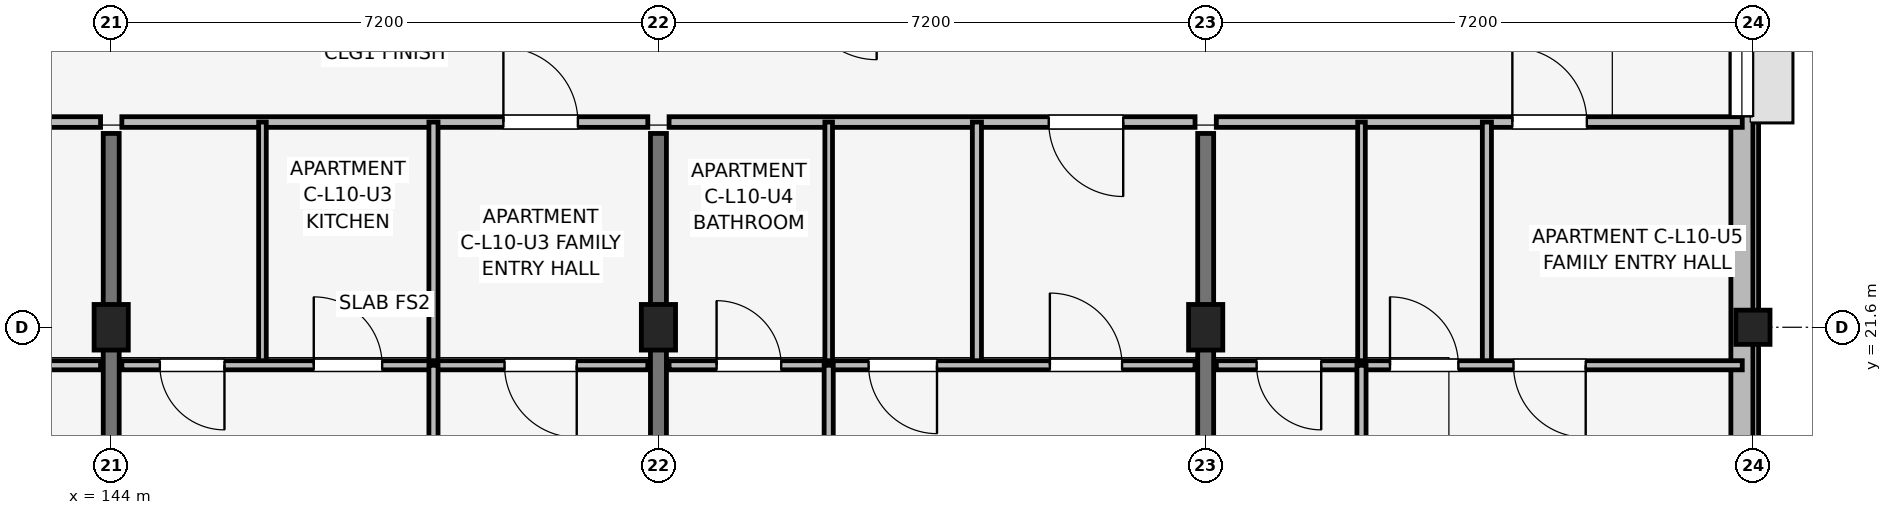
"""IFC4 building model, lengths in metres.
Left out: names, types, materials, properties, quantities, classifications, styles, units other than length and angle.
Written with IfcOpenShell. Run it as: python <this file> out.ifc"""

import sys

from ifc_helpers import new_model, si_unit, direction, frame, frame_2d, origin, origin_2d, place, context, subcontext, project, spatial, rectangle, extrude, element, fill, save


model = new_model("IFC4")
c1 = context("Model", 3, precision=1e-05, world=origin(), true_north=direction((0.0, 1.0)))
c2 = subcontext(c1, "Body", "Model", "MODEL_VIEW")
j1 = project(units=[si_unit("LENGTHUNIT", "METRE"), si_unit("PLANEANGLEUNIT", "RADIAN")], contexts=[c1])
p1 = place(None, origin())
s1 = spatial("IfcSite", under=j1, at=p1, CompositionType="ELEMENT")
p2 = place(p1, origin())
s2 = spatial("IfcBuilding", under=s1, at=p2, CompositionType="ELEMENT")
p3 = place(p2, frame((0.0, 0.0, 33.9)))
s3 = spatial("IfcBuildingStorey", under=s2, at=p3, CompositionType="ELEMENT", Elevation=33.9)
for number, where, z_axis, x_axis in (
    (1, (144.0, 21.6, 0.0), (0.0, 0.0, 1.0), (1.0, 0.0, 0.0)),
    (2, (151.2, 21.6, 0.0), (0.0, 0.0, 1.0), (1.0, 0.0, 0.0)),
    (3, (158.4, 21.6, 0.0), (0.0, 0.0, 1.0), (1.0, 0.0, 0.0)),
):
    element("IfcColumn", number, at=place(p3, frame(where, z_axis=z_axis, x_axis=x_axis)), inside=s3, PredefinedType="COLUMN", context=c2, shape_type="SweptSolid", body=[
        extrude(rectangle(XDim=0.45, YDim=0.6, at=origin_2d()), origin(), (0.0, 0.0, 1.0), 3.15),
    ])
p4 = place(p3, frame((165.6, 21.6, 0.0), z_axis=(0.0, 0.0, 1.0), x_axis=(1.0, 0.0, 0.0)))
e4 = element("IfcColumn", 4, at=p4, inside=s3, PredefinedType="COLUMN", context=c2, shape_type="SweptSolid", body=[
    extrude(rectangle(XDim=0.45, YDim=0.45, at=origin_2d()), origin(), (0.0, 0.0, 1.0), 3.15),
])
for number, where, z_axis, x_axis in (
    (5, (144.0, 14.75, 0.0), (0.0, 0.0, 1.0), (0.0, 1.0, 0.0)),
    (6, (151.2, 14.75, 0.0), (0.0, 0.0, 1.0), (0.0, 1.0, 0.0)),
    (7, (158.4, 14.75, 0.0), (0.0, 0.0, 1.0), (0.0, 1.0, 0.0)),
):
    element("IfcWall", number, at=place(p3, frame(where, z_axis=z_axis, x_axis=x_axis)), inside=s3, PredefinedType="SHEAR", context=c2, shape_type="SweptSolid", body=[
        extrude(rectangle(XDim=9.4, YDim=0.21, at=frame_2d((4.7, 0.0))), origin(), (0.0, 0.0, 1.0), 3.15),
    ])
p5 = place(p3, frame((165.455, 17.4, 0.0), z_axis=(0.0, 0.0, 1.0), x_axis=(0.0, 1.0, 0.0)))
e8 = element("IfcWall", 8, at=p5, inside=s3, PredefinedType="SOLIDWALL", context=c2, shape_type="SweptSolid", body=[
    extrude(rectangle(XDim=15.6, YDim=0.29, at=frame_2d((7.8, 0.0))), origin(), (0.0, 0.0, 1.0), 2.48),
])
p6 = place(p5, frame((6.975, 0.0, 1.05)))
e9 = element("IfcOpeningElement", 9, at=p6, cuts=e8, PredefinedType="OPENING", context=c2, shape_type="SweptSolid", body=[
    extrude(rectangle(XDim=1.65, YDim=1.15, at=frame_2d((0.825, 0.575))), frame((0.0, 0.155, 0.0), z_axis=(0.0, -1.0, 0.0), x_axis=(1.0, 0.0, 0.0)), (0.0, 0.0, 1.0), 0.31),
])
p7 = place(p5, frame((1.255, 0.0, 0.75)))
e10 = element("IfcOpeningElement", 10, at=p7, cuts=e8, PredefinedType="OPENING", context=c2, shape_type="SweptSolid", body=[
    extrude(rectangle(XDim=1.42, YDim=1.6, at=frame_2d((0.71, 0.8))), frame((0.0, 0.155, 0.0), z_axis=(0.0, -1.0, 0.0), x_axis=(1.0, 0.0, 0.0)), (0.0, 0.0, 1.0), 0.31),
])
p8 = place(p3, frame((136.94, 24.3, 0.0), z_axis=(0.0, 0.0, 1.0), x_axis=(1.0, 0.0, 0.0)))
e11 = element("IfcWall", 11, at=p8, inside=s3, PredefinedType="PARTITIONING", context=c2, shape_type="SweptSolid", body=[
    extrude(rectangle(XDim=6.92, YDim=0.14, at=frame_2d((3.46, 0.0))), origin(), (0.0, 0.0, 1.0), 2.38),
])
p9 = place(p8, frame((5.85, 0.0, 0.0), z_axis=(0.0, 0.0, 1.0), x_axis=(-1.0, 0.0, 0.0)))
e12 = element("IfcOpeningElement", 12, at=p9, cuts=e11, PredefinedType="OPENING", context=c2, shape_type="SweptSolid", body=[
    extrude(rectangle(XDim=0.98, YDim=2.1, at=frame_2d((0.49, 1.05))), frame((0.0, 0.08, 0.0), z_axis=(0.0, -1.0, 0.0), x_axis=(1.0, 0.0, 0.0)), (0.0, 0.0, 1.0), 0.16),
])
p10 = place(p3, frame((136.94, 21.1, 0.0), z_axis=(0.0, 0.0, 1.0), x_axis=(1.0, 0.0, 0.0)))
e13 = element("IfcWall", 13, at=p10, inside=s3, PredefinedType="PARTITIONING", context=c2, shape_type="SweptSolid", body=[
    extrude(rectangle(XDim=6.92, YDim=0.12, at=frame_2d((3.46, 0.0))), origin(), (0.0, 0.0, 1.0), 2.38),
])
p11 = place(p10, frame((0.5, 0.0, 0.0)))
e14 = element("IfcOpeningElement", 14, at=p11, cuts=e13, PredefinedType="OPENING", context=c2, shape_type="SweptSolid", body=[
    extrude(rectangle(XDim=0.85, YDim=2.08, at=frame_2d((0.425, 1.04))), frame((0.0, 0.07, 0.0), z_axis=(0.0, -1.0, 0.0), x_axis=(1.0, 0.0, 0.0)), (0.0, 0.0, 1.0), 0.14),
])
p12 = place(p10, frame((3.275, 0.0, 0.0), z_axis=(0.0, 0.0, 1.0), x_axis=(-1.0, 0.0, 0.0)))
e15 = element("IfcOpeningElement", 15, at=p12, cuts=e13, PredefinedType="OPENING", context=c2, shape_type="SweptSolid", body=[
    extrude(rectangle(XDim=0.9, YDim=2.08, at=frame_2d((0.45, 1.04))), frame((0.0, 0.07, 0.0), z_axis=(0.0, -1.0, 0.0), x_axis=(1.0, 0.0, 0.0)), (0.0, 0.0, 1.0), 0.14),
])
p13 = place(p10, frame((4.885, 0.0, 0.0)))
e16 = element("IfcOpeningElement", 16, at=p13, cuts=e13, PredefinedType="OPENING", context=c2, shape_type="SweptSolid", body=[
    extrude(rectangle(XDim=0.95, YDim=2.08, at=frame_2d((0.475, 1.04))), frame((0.0, 0.07, 0.0), z_axis=(0.0, -1.0, 0.0), x_axis=(1.0, 0.0, 0.0)), (0.0, 0.0, 1.0), 0.14),
])
p14 = place(p3, frame((144.14, 24.3, 0.0), z_axis=(0.0, 0.0, 1.0), x_axis=(1.0, 0.0, 0.0)))
e17 = element("IfcWall", 17, at=p14, inside=s3, PredefinedType="PARTITIONING", context=c2, shape_type="SweptSolid", body=[
    extrude(rectangle(XDim=6.92, YDim=0.14, at=frame_2d((3.46, 0.0))), origin(), (0.0, 0.0, 1.0), 2.38),
])
p15 = place(p14, frame((5.02, 0.0, 0.0)))
e18 = element("IfcOpeningElement", 18, at=p15, cuts=e17, PredefinedType="OPENING", context=c2, shape_type="SweptSolid", body=[
    extrude(rectangle(XDim=0.98, YDim=2.1, at=frame_2d((0.49, 1.05))), frame((0.0, 0.08, 0.0), z_axis=(0.0, -1.0, 0.0), x_axis=(1.0, 0.0, 0.0)), (0.0, 0.0, 1.0), 0.16),
])
p16 = place(p3, frame((145.99, 21.1, 0.0), z_axis=(0.0, 0.0, 1.0), x_axis=(0.0, 1.0, 0.0)))
e19 = element("IfcWall", 19, at=p16, inside=s3, PredefinedType="PARTITIONING", context=c2, shape_type="SweptSolid", body=[
    extrude(rectangle(XDim=3.2, YDim=0.1, at=frame_2d((1.6, 0.0))), origin(), (0.0, 0.0, 1.0), 2.38),
])
p17 = place(p3, frame((148.24, 21.1, 0.0), z_axis=(0.0, 0.0, 1.0), x_axis=(0.0, 1.0, 0.0)))
e20 = element("IfcWall", 20, at=p17, inside=s3, PredefinedType="PARTITIONING", context=c2, shape_type="SweptSolid", body=[
    extrude(rectangle(XDim=3.2, YDim=0.12, at=frame_2d((1.6, 0.0))), origin(), (0.0, 0.0, 1.0), 2.38),
])
p18 = place(p3, frame((144.14, 21.1, 0.0), z_axis=(0.0, 0.0, 1.0), x_axis=(1.0, 0.0, 0.0)))
e21 = element("IfcWall", 21, at=p18, inside=s3, PredefinedType="PARTITIONING", context=c2, shape_type="SweptSolid", body=[
    extrude(rectangle(XDim=6.92, YDim=0.12, at=frame_2d((3.46, 0.0))), origin(), (0.0, 0.0, 1.0), 2.38),
])
p19 = place(p18, frame((1.35, 0.0, 0.0), z_axis=(0.0, 0.0, 1.0), x_axis=(-1.0, 0.0, 0.0)))
e22 = element("IfcOpeningElement", 22, at=p19, cuts=e21, PredefinedType="OPENING", context=c2, shape_type="SweptSolid", body=[
    extrude(rectangle(XDim=0.85, YDim=2.08, at=frame_2d((0.425, 1.04))), frame((0.0, 0.07, 0.0), z_axis=(0.0, -1.0, 0.0), x_axis=(1.0, 0.0, 0.0)), (0.0, 0.0, 1.0), 0.14),
])
p20 = place(p18, frame((2.525, 0.0, 0.0)))
e23 = element("IfcOpeningElement", 23, at=p20, cuts=e21, PredefinedType="OPENING", context=c2, shape_type="SweptSolid", body=[
    extrude(rectangle(XDim=0.9, YDim=2.08, at=frame_2d((0.45, 1.04))), frame((0.0, 0.07, 0.0), z_axis=(0.0, -1.0, 0.0), x_axis=(1.0, 0.0, 0.0)), (0.0, 0.0, 1.0), 0.14),
])
p21 = place(p18, frame((5.985, 0.0, 0.0), z_axis=(0.0, 0.0, 1.0), x_axis=(-1.0, 0.0, 0.0)))
e24 = element("IfcOpeningElement", 24, at=p21, cuts=e21, PredefinedType="OPENING", context=c2, shape_type="SweptSolid", body=[
    extrude(rectangle(XDim=0.95, YDim=2.08, at=frame_2d((0.475, 1.04))), frame((0.0, 0.07, 0.0), z_axis=(0.0, -1.0, 0.0), x_axis=(1.0, 0.0, 0.0)), (0.0, 0.0, 1.0), 0.14),
])
p22 = place(p3, frame((148.24, 14.7, 0.0), z_axis=(0.0, 0.0, 1.0), x_axis=(0.0, 1.0, 0.0)))
e25 = element("IfcWall", 25, at=p22, inside=s3, PredefinedType="PARTITIONING", context=c2, shape_type="SweptSolid", body=[
    extrude(rectangle(XDim=6.4, YDim=0.12, at=frame_2d((3.2, 0.0))), origin(), (0.0, 0.0, 1.0), 2.38),
])
p23 = place(p22, frame((2.75, 0.0, 0.0)))
e26 = element("IfcOpeningElement", 26, at=p23, cuts=e25, PredefinedType="OPENING", context=c2, shape_type="SweptSolid", body=[
    extrude(rectangle(XDim=0.9, YDim=2.08, at=frame_2d((0.45, 1.04))), frame((0.0, 0.07, 0.0), z_axis=(0.0, -1.0, 0.0), x_axis=(1.0, 0.0, 0.0)), (0.0, 0.0, 1.0), 0.14),
])
p24 = place(p3, frame((151.34, 24.3, 0.0), z_axis=(0.0, 0.0, 1.0), x_axis=(1.0, 0.0, 0.0)))
e27 = element("IfcWall", 27, at=p24, inside=s3, PredefinedType="PARTITIONING", context=c2, shape_type="SweptSolid", body=[
    extrude(rectangle(XDim=6.92, YDim=0.14, at=frame_2d((3.46, 0.0))), origin(), (0.0, 0.0, 1.0), 2.38),
])
p25 = place(p24, frame((5.975, 0.0, 0.0), z_axis=(0.0, 0.0, 1.0), x_axis=(-1.0, 0.0, 0.0)))
e28 = element("IfcOpeningElement", 28, at=p25, cuts=e27, PredefinedType="OPENING", context=c2, shape_type="SweptSolid", body=[
    extrude(rectangle(XDim=0.98, YDim=2.1, at=frame_2d((0.49, 1.05))), frame((0.0, 0.08, 0.0), z_axis=(0.0, -1.0, 0.0), x_axis=(1.0, 0.0, 0.0)), (0.0, 0.0, 1.0), 0.16),
])
p26 = place(p3, frame((153.44, 21.1, 0.0), z_axis=(0.0, 0.0, 1.0), x_axis=(0.0, 1.0, 0.0)))
e29 = element("IfcWall", 29, at=p26, inside=s3, PredefinedType="PARTITIONING", context=c2, shape_type="SweptSolid", body=[
    extrude(rectangle(XDim=3.2, YDim=0.1, at=frame_2d((1.6, 0.0))), origin(), (0.0, 0.0, 1.0), 2.38),
])
p27 = place(p3, frame((155.39, 21.1, 0.0), z_axis=(0.0, 0.0, 1.0), x_axis=(0.0, 1.0, 0.0)))
e30 = element("IfcWall", 30, at=p27, inside=s3, PredefinedType="PARTITIONING", context=c2, shape_type="SweptSolid", body=[
    extrude(rectangle(XDim=3.2, YDim=0.12, at=frame_2d((1.6, 0.0))), origin(), (0.0, 0.0, 1.0), 2.38),
])
p28 = place(p3, frame((151.34, 21.1, 0.0), z_axis=(0.0, 0.0, 1.0), x_axis=(1.0, 0.0, 0.0)))
e31 = element("IfcWall", 31, at=p28, inside=s3, PredefinedType="PARTITIONING", context=c2, shape_type="SweptSolid", body=[
    extrude(rectangle(XDim=6.92, YDim=0.12, at=frame_2d((3.46, 0.0))), origin(), (0.0, 0.0, 1.0), 2.38),
])
p29 = place(p28, frame((0.625, 0.0, 0.0)))
e32 = element("IfcOpeningElement", 32, at=p29, cuts=e31, PredefinedType="OPENING", context=c2, shape_type="SweptSolid", body=[
    extrude(rectangle(XDim=0.85, YDim=2.08, at=frame_2d((0.425, 1.04))), frame((0.0, 0.07, 0.0), z_axis=(0.0, -1.0, 0.0), x_axis=(1.0, 0.0, 0.0)), (0.0, 0.0, 1.0), 0.14),
])
p30 = place(p28, frame((3.525, 0.0, 0.0), z_axis=(0.0, 0.0, 1.0), x_axis=(-1.0, 0.0, 0.0)))
e33 = element("IfcOpeningElement", 33, at=p30, cuts=e31, PredefinedType="OPENING", context=c2, shape_type="SweptSolid", body=[
    extrude(rectangle(XDim=0.9, YDim=2.08, at=frame_2d((0.45, 1.04))), frame((0.0, 0.07, 0.0), z_axis=(0.0, -1.0, 0.0), x_axis=(1.0, 0.0, 0.0)), (0.0, 0.0, 1.0), 0.14),
])
p31 = place(p28, frame((5.01, 0.0, 0.0)))
e34 = element("IfcOpeningElement", 34, at=p31, cuts=e31, PredefinedType="OPENING", context=c2, shape_type="SweptSolid", body=[
    extrude(rectangle(XDim=0.95, YDim=2.08, at=frame_2d((0.475, 1.04))), frame((0.0, 0.07, 0.0), z_axis=(0.0, -1.0, 0.0), x_axis=(1.0, 0.0, 0.0)), (0.0, 0.0, 1.0), 0.14),
])
p32 = place(p3, frame((153.44, 14.7, 0.0), z_axis=(0.0, 0.0, 1.0), x_axis=(0.0, 1.0, 0.0)))
e35 = element("IfcWall", 35, at=p32, inside=s3, PredefinedType="PARTITIONING", context=c2, shape_type="SweptSolid", body=[
    extrude(rectangle(XDim=6.4, YDim=0.12, at=frame_2d((3.2, 0.0))), origin(), (0.0, 0.0, 1.0), 2.38),
])
p33 = place(p32, frame((3.65, 0.0, 0.0), z_axis=(0.0, 0.0, 1.0), x_axis=(-1.0, 0.0, 0.0)))
e36 = element("IfcOpeningElement", 36, at=p33, cuts=e35, PredefinedType="OPENING", context=c2, shape_type="SweptSolid", body=[
    extrude(rectangle(XDim=0.9, YDim=2.08, at=frame_2d((0.45, 1.04))), frame((0.0, 0.07, 0.0), z_axis=(0.0, -1.0, 0.0), x_axis=(1.0, 0.0, 0.0)), (0.0, 0.0, 1.0), 0.14),
])
p34 = place(p3, frame((158.54, 24.3, 0.0), z_axis=(0.0, 0.0, 1.0), x_axis=(1.0, 0.0, 0.0)))
e37 = element("IfcWall", 37, at=p34, inside=s3, PredefinedType="PARTITIONING", context=c2, shape_type="SweptSolid", body=[
    extrude(rectangle(XDim=6.92, YDim=0.14, at=frame_2d((3.46, 0.0))), origin(), (0.0, 0.0, 1.0), 2.38),
])
p35 = place(p34, frame((3.895, 0.0, 0.0)))
e38 = element("IfcOpeningElement", 38, at=p35, cuts=e37, PredefinedType="OPENING", context=c2, shape_type="SweptSolid", body=[
    extrude(rectangle(XDim=0.98, YDim=2.1, at=frame_2d((0.49, 1.05))), frame((0.0, 0.08, 0.0), z_axis=(0.0, -1.0, 0.0), x_axis=(1.0, 0.0, 0.0)), (0.0, 0.0, 1.0), 0.16),
])
p36 = place(p3, frame((160.45, 21.1, 0.0), z_axis=(0.0, 0.0, 1.0), x_axis=(0.0, 1.0, 0.0)))
e39 = element("IfcWall", 39, at=p36, inside=s3, PredefinedType="PARTITIONING", context=c2, shape_type="SweptSolid", body=[
    extrude(rectangle(XDim=3.2, YDim=0.1, at=frame_2d((1.6, 0.0))), origin(), (0.0, 0.0, 1.0), 2.38),
])
p37 = place(p3, frame((162.1, 21.1, 0.0), z_axis=(0.0, 0.0, 1.0), x_axis=(0.0, 1.0, 0.0)))
e40 = element("IfcWall", 40, at=p37, inside=s3, PredefinedType="PARTITIONING", context=c2, shape_type="SweptSolid", body=[
    extrude(rectangle(XDim=3.2, YDim=0.12, at=frame_2d((1.6, 0.0))), origin(), (0.0, 0.0, 1.0), 2.38),
])
p38 = place(p3, frame((158.54, 21.1, 0.0), z_axis=(0.0, 0.0, 1.0), x_axis=(1.0, 0.0, 0.0)))
e41 = element("IfcWall", 41, at=p38, inside=s3, PredefinedType="PARTITIONING", context=c2, shape_type="SweptSolid", body=[
    extrude(rectangle(XDim=6.92, YDim=0.12, at=frame_2d((3.46, 0.0))), origin(), (0.0, 0.0, 1.0), 2.38),
])
p39 = place(p38, frame((1.38, 0.0, 0.0), z_axis=(0.0, 0.0, 1.0), x_axis=(-1.0, 0.0, 0.0)))
e42 = element("IfcOpeningElement", 42, at=p39, cuts=e41, PredefinedType="OPENING", context=c2, shape_type="SweptSolid", body=[
    extrude(rectangle(XDim=0.85, YDim=2.08, at=frame_2d((0.425, 1.04))), frame((0.0, 0.07, 0.0), z_axis=(0.0, -1.0, 0.0), x_axis=(1.0, 0.0, 0.0)), (0.0, 0.0, 1.0), 0.14),
])
p40 = place(p38, frame((2.285, 0.0, 0.0)))
e43 = element("IfcOpeningElement", 43, at=p40, cuts=e41, PredefinedType="OPENING", context=c2, shape_type="SweptSolid", body=[
    extrude(rectangle(XDim=0.9, YDim=2.08, at=frame_2d((0.45, 1.04))), frame((0.0, 0.07, 0.0), z_axis=(0.0, -1.0, 0.0), x_axis=(1.0, 0.0, 0.0)), (0.0, 0.0, 1.0), 0.14),
])
p41 = place(p38, frame((4.86, 0.0, 0.0), z_axis=(0.0, 0.0, 1.0), x_axis=(-1.0, 0.0, 0.0)))
e44 = element("IfcOpeningElement", 44, at=p41, cuts=e41, PredefinedType="OPENING", context=c2, shape_type="SweptSolid", body=[
    extrude(rectangle(XDim=0.95, YDim=2.08, at=frame_2d((0.475, 1.04))), frame((0.0, 0.07, 0.0), z_axis=(0.0, -1.0, 0.0), x_axis=(1.0, 0.0, 0.0)), (0.0, 0.0, 1.0), 0.14),
])
p42 = place(p3, frame((160.45, 14.7, 0.0), z_axis=(0.0, 0.0, 1.0), x_axis=(0.0, 1.0, 0.0)))
e45 = element("IfcWall", 45, at=p42, inside=s3, PredefinedType="PARTITIONING", context=c2, shape_type="SweptSolid", body=[
    extrude(rectangle(XDim=6.4, YDim=0.12, at=frame_2d((3.2, 0.0))), origin(), (0.0, 0.0, 1.0), 2.38),
])
p43 = place(p42, frame((2.75, 0.0, 0.0)))
e46 = element("IfcOpeningElement", 46, at=p43, cuts=e45, PredefinedType="OPENING", context=c2, shape_type="SweptSolid", body=[
    extrude(rectangle(XDim=0.9, YDim=2.08, at=frame_2d((0.45, 1.04))), frame((0.0, 0.07, 0.0), z_axis=(0.0, -1.0, 0.0), x_axis=(1.0, 0.0, 0.0)), (0.0, 0.0, 1.0), 0.14),
])
p44 = place(p6, origin())
e47 = element("IfcWindow", 47, at=p44, inside=s3, PartitioningType="SINGLE_PANEL", PredefinedType="WINDOW", context=c2, shape_type="SweptSolid", body=[
    extrude(rectangle(XDim=1.65, YDim=1.15, at=frame_2d((0.825, 0.575))), frame((0.0, 0.03, 0.0), z_axis=(0.0, -1.0, 0.0), x_axis=(1.0, 0.0, 0.0)), (0.0, 0.0, 1.0), 0.06),
])
fill(e9, e47)
p45 = place(p15, origin())
e48 = element("IfcDoor", 48, at=p45, inside=s3, OperationType="SINGLE_SWING_LEFT", PredefinedType="DOOR", context=c2, shape_type="SweptSolid", body=[
    extrude(rectangle(XDim=0.98, YDim=2.1, at=frame_2d((0.49, 1.05))), frame((0.0, 0.025, 0.0), z_axis=(0.0, -1.0, 0.0), x_axis=(1.0, 0.0, 0.0)), (0.0, 0.0, 1.0), 0.05),
])
fill(e18, e48)
p46 = place(p19, origin())
e49 = element("IfcDoor", 49, at=p46, inside=s3, OperationType="SINGLE_SWING_RIGHT", PredefinedType="DOOR", context=c2, shape_type="SweptSolid", body=[
    extrude(rectangle(XDim=0.85, YDim=2.08, at=frame_2d((0.425, 1.04))), frame((0.0, 0.025, 0.0), z_axis=(0.0, -1.0, 0.0), x_axis=(1.0, 0.0, 0.0)), (0.0, 0.0, 1.0), 0.05),
])
fill(e22, e49)
p47 = place(p20, origin())
e50 = element("IfcDoor", 50, at=p47, inside=s3, OperationType="SINGLE_SWING_LEFT", PredefinedType="DOOR", context=c2, shape_type="SweptSolid", body=[
    extrude(rectangle(XDim=0.9, YDim=2.08, at=frame_2d((0.45, 1.04))), frame((0.0, 0.025, 0.0), z_axis=(0.0, -1.0, 0.0), x_axis=(1.0, 0.0, 0.0)), (0.0, 0.0, 1.0), 0.05),
])
fill(e23, e50)
p48 = place(p21, origin())
e51 = element("IfcDoor", 51, at=p48, inside=s3, OperationType="SINGLE_SWING_RIGHT", PredefinedType="DOOR", context=c2, shape_type="SweptSolid", body=[
    extrude(rectangle(XDim=0.95, YDim=2.08, at=frame_2d((0.475, 1.04))), frame((0.0, 0.025, 0.0), z_axis=(0.0, -1.0, 0.0), x_axis=(1.0, 0.0, 0.0)), (0.0, 0.0, 1.0), 0.05),
])
fill(e24, e51)
p49 = place(p25, origin())
e52 = element("IfcDoor", 52, at=p49, inside=s3, OperationType="SINGLE_SWING_RIGHT", PredefinedType="DOOR", context=c2, shape_type="SweptSolid", body=[
    extrude(rectangle(XDim=0.98, YDim=2.1, at=frame_2d((0.49, 1.05))), frame((0.0, 0.025, 0.0), z_axis=(0.0, -1.0, 0.0), x_axis=(1.0, 0.0, 0.0)), (0.0, 0.0, 1.0), 0.05),
])
fill(e28, e52)
p50 = place(p29, origin())
e53 = element("IfcDoor", 53, at=p50, inside=s3, OperationType="SINGLE_SWING_LEFT", PredefinedType="DOOR", context=c2, shape_type="SweptSolid", body=[
    extrude(rectangle(XDim=0.85, YDim=2.08, at=frame_2d((0.425, 1.04))), frame((0.0, 0.025, 0.0), z_axis=(0.0, -1.0, 0.0), x_axis=(1.0, 0.0, 0.0)), (0.0, 0.0, 1.0), 0.05),
])
fill(e32, e53)
p51 = place(p30, origin())
e54 = element("IfcDoor", 54, at=p51, inside=s3, OperationType="SINGLE_SWING_RIGHT", PredefinedType="DOOR", context=c2, shape_type="SweptSolid", body=[
    extrude(rectangle(XDim=0.9, YDim=2.08, at=frame_2d((0.45, 1.04))), frame((0.0, 0.025, 0.0), z_axis=(0.0, -1.0, 0.0), x_axis=(1.0, 0.0, 0.0)), (0.0, 0.0, 1.0), 0.05),
])
fill(e33, e54)
p52 = place(p31, origin())
e55 = element("IfcDoor", 55, at=p52, inside=s3, OperationType="SINGLE_SWING_LEFT", PredefinedType="DOOR", context=c2, shape_type="SweptSolid", body=[
    extrude(rectangle(XDim=0.95, YDim=2.08, at=frame_2d((0.475, 1.04))), frame((0.0, 0.025, 0.0), z_axis=(0.0, -1.0, 0.0), x_axis=(1.0, 0.0, 0.0)), (0.0, 0.0, 1.0), 0.05),
])
fill(e34, e55)
p53 = place(p35, origin())
e56 = element("IfcDoor", 56, at=p53, inside=s3, OperationType="SINGLE_SWING_LEFT", PredefinedType="DOOR", context=c2, shape_type="SweptSolid", body=[
    extrude(rectangle(XDim=0.98, YDim=2.1, at=frame_2d((0.49, 1.05))), frame((0.0, 0.025, 0.0), z_axis=(0.0, -1.0, 0.0), x_axis=(1.0, 0.0, 0.0)), (0.0, 0.0, 1.0), 0.05),
])
fill(e38, e56)
p54 = place(p39, origin())
e57 = element("IfcDoor", 57, at=p54, inside=s3, OperationType="SINGLE_SWING_RIGHT", PredefinedType="DOOR", context=c2, shape_type="SweptSolid", body=[
    extrude(rectangle(XDim=0.85, YDim=2.08, at=frame_2d((0.425, 1.04))), frame((0.0, 0.025, 0.0), z_axis=(0.0, -1.0, 0.0), x_axis=(1.0, 0.0, 0.0)), (0.0, 0.0, 1.0), 0.05),
])
fill(e42, e57)
p55 = place(p40, origin())
e58 = element("IfcDoor", 58, at=p55, inside=s3, OperationType="SINGLE_SWING_LEFT", PredefinedType="DOOR", context=c2, shape_type="SweptSolid", body=[
    extrude(rectangle(XDim=0.9, YDim=2.08, at=frame_2d((0.45, 1.04))), frame((0.0, 0.025, 0.0), z_axis=(0.0, -1.0, 0.0), x_axis=(1.0, 0.0, 0.0)), (0.0, 0.0, 1.0), 0.05),
])
fill(e43, e58)
p56 = place(p41, origin())
e59 = element("IfcDoor", 59, at=p56, inside=s3, OperationType="SINGLE_SWING_RIGHT", PredefinedType="DOOR", context=c2, shape_type="SweptSolid", body=[
    extrude(rectangle(XDim=0.95, YDim=2.08, at=frame_2d((0.475, 1.04))), frame((0.0, 0.025, 0.0), z_axis=(0.0, -1.0, 0.0), x_axis=(1.0, 0.0, 0.0)), (0.0, 0.0, 1.0), 0.05),
])
fill(e44, e59)
save(model, sys.argv[1])
